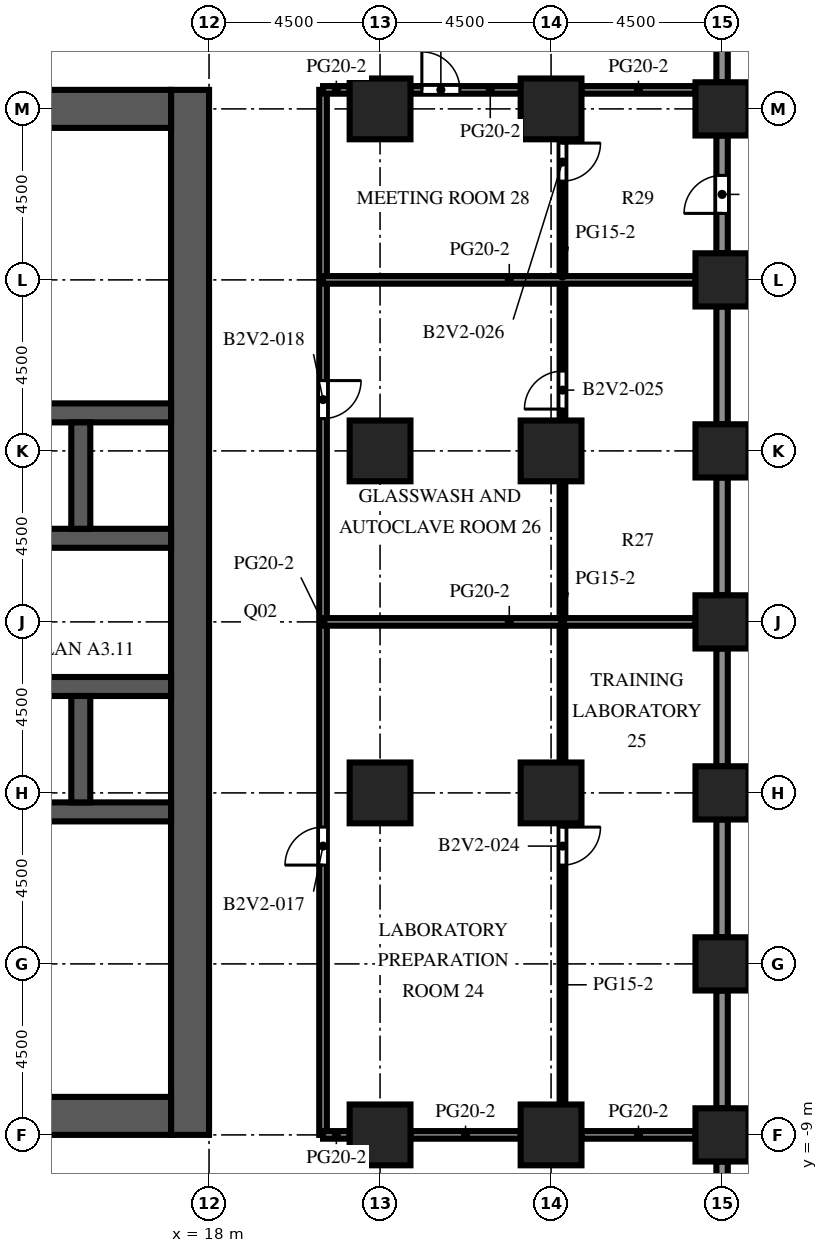
"""IFC4 building model, lengths in metres.
Left out: names, types, materials, properties, quantities, classifications, styles, units other than length and angle.
Written with IfcOpenShell. Run it as: python <this file> out.ifc"""

import sys

from ifc_helpers import new_model, si_unit, direction, frame, frame_2d, origin, origin_2d, place, context, subcontext, project, spatial, rectangle, extrude, element, fill, save


model = new_model("IFC4")
c1 = context("Model", 3, precision=1e-05, world=origin(), true_north=direction((0.0, 1.0)))
c2 = subcontext(c1, "Body", "Model", "MODEL_VIEW")
j1 = project(units=[si_unit("LENGTHUNIT", "METRE"), si_unit("PLANEANGLEUNIT", "RADIAN")], contexts=[c1])
p1 = place(None, origin())
s1 = spatial("IfcSite", under=j1, at=p1, CompositionType="ELEMENT")
p2 = place(p1, origin())
s2 = spatial("IfcBuilding", under=s1, at=p2, CompositionType="ELEMENT")
p3 = place(p2, frame((0.0, 0.0, 66.5)))
s3 = spatial("IfcBuildingStorey", under=s2, at=p3, CompositionType="ELEMENT", Elevation=66.5)
for number, where, z_axis, x_axis in (
    (1, (31.5, -9.0, 0.0), (0.0, 0.0, 1.0), (1.0, 0.0, 0.0)),
    (2, (31.5, -4.5, 0.0), (0.0, 0.0, 1.0), (1.0, 0.0, 0.0)),
    (3, (31.5, 0.0, 0.0), (0.0, 0.0, 1.0), (1.0, 0.0, 0.0)),
    (4, (31.5, 4.5, 0.0), (0.0, 0.0, 1.0), (1.0, 0.0, 0.0)),
    (5, (31.5, 9.0, 0.0), (0.0, 0.0, 1.0), (1.0, 0.0, 0.0)),
    (6, (31.5, 13.5, 0.0), (0.0, 0.0, 1.0), (1.0, 0.0, 0.0)),
    (7, (31.5, 18.0, 0.0), (0.0, 0.0, 1.0), (1.0, 0.0, 0.0)),
):
    element("IfcColumn", number, at=place(p3, frame(where, z_axis=z_axis, x_axis=x_axis)), inside=s3, PredefinedType="COLUMN", context=c2, shape_type="SweptSolid", body=[
        extrude(rectangle(XDim=1.4, YDim=1.4, at=origin_2d()), origin(), (0.0, 0.0, 1.0), 4.1),
    ])
for number, where, z_axis, x_axis in (
    (8, (22.5, -9.0, 0.0), (0.0, 0.0, 1.0), (1.0, 0.0, 0.0)),
    (9, (22.5, 0.0, 0.0), (0.0, 0.0, 1.0), (1.0, 0.0, 0.0)),
    (10, (22.5, 9.0, 0.0), (0.0, 0.0, 1.0), (1.0, 0.0, 0.0)),
    (11, (22.5, 18.0, 0.0), (0.0, 0.0, 1.0), (1.0, 0.0, 0.0)),
    (12, (27.0, -9.0, 0.0), (0.0, 0.0, 1.0), (1.0, 0.0, 0.0)),
    (13, (27.0, 0.0, 0.0), (0.0, 0.0, 1.0), (1.0, 0.0, 0.0)),
    (14, (27.0, 9.0, 0.0), (0.0, 0.0, 1.0), (1.0, 0.0, 0.0)),
    (15, (27.0, 18.0, 0.0), (0.0, 0.0, 1.0), (1.0, 0.0, 0.0)),
):
    element("IfcColumn", number, at=place(p3, frame(where, z_axis=z_axis, x_axis=x_axis)), inside=s3, PredefinedType="COLUMN", context=c2, shape_type="SweptSolid", body=[
        extrude(rectangle(XDim=1.6, YDim=1.6, at=origin_2d()), origin(), (0.0, 0.0, 1.0), 4.1),
    ])
p4 = place(p3, frame((17.5, -9.0, 0.0), z_axis=(0.0, 0.0, 1.0), x_axis=(0.0, 1.0, 0.0)))
e16 = element("IfcWall", 16, at=p4, inside=s3, PredefinedType="SHEAR", context=c2, shape_type="SweptSolid", body=[
    extrude(rectangle(XDim=27.5, YDim=1.0, at=frame_2d((13.75, 0.0))), origin(), (0.0, 0.0, 1.0), 4.1),
])
p5 = place(p4, frame((12.55, 0.0, 0.0)))
e17 = element("IfcOpeningElement", 17, at=p5, cuts=e16, PredefinedType="OPENING", context=c2, shape_type="SweptSolid", body=[
    extrude(rectangle(XDim=2.4, YDim=2.4, at=frame_2d((1.2, 1.2))), frame((0.0, 0.51, 0.0), z_axis=(0.0, -1.0, 0.0), x_axis=(1.0, 0.0, 0.0)), (0.0, 0.0, 1.0), 1.02),
])
p6 = place(p4, frame((6.825, 0.0, 0.0)))
e18 = element("IfcOpeningElement", 18, at=p6, cuts=e16, PredefinedType="OPENING", context=c2, shape_type="SweptSolid", body=[
    extrude(rectangle(XDim=1.2, YDim=2.1, at=frame_2d((0.6, 1.05))), frame((0.0, 0.51, 0.0), z_axis=(0.0, -1.0, 0.0), x_axis=(1.0, 0.0, 0.0)), (0.0, 0.0, 1.0), 1.02),
])
p7 = place(p4, frame((19.475, 0.0, 0.0)))
e19 = element("IfcOpeningElement", 19, at=p7, cuts=e16, PredefinedType="OPENING", context=c2, shape_type="SweptSolid", body=[
    extrude(rectangle(XDim=1.2, YDim=2.1, at=frame_2d((0.6, 1.05))), frame((0.0, 0.51, 0.0), z_axis=(0.0, -1.0, 0.0), x_axis=(1.0, 0.0, 0.0)), (0.0, 0.0, 1.0), 1.02),
])
for number, where, z_axis, x_axis in (
    (20, (7.0, -8.5, 0.0), (0.0, 0.0, 1.0), (1.0, 0.0, 0.0)),
    (21, (7.0, 18.0, 0.0), (0.0, 0.0, 1.0), (1.0, 0.0, 0.0)),
):
    element("IfcWall", number, at=place(p3, frame(where, z_axis=z_axis, x_axis=x_axis)), inside=s3, PredefinedType="SHEAR", context=c2, shape_type="SweptSolid", body=[
        extrude(rectangle(XDim=10.0, YDim=1.0, at=frame_2d((5.0, 0.0))), origin(), (0.0, 0.0, 1.0), 4.1),
    ])
p8 = place(p3, frame((7.0, -0.5, 0.0), z_axis=(0.0, 0.0, 1.0), x_axis=(1.0, 0.0, 0.0)))
e22 = element("IfcWall", 22, at=p8, inside=s3, PredefinedType="SHEAR", context=c2, shape_type="SweptSolid", body=[
    extrude(rectangle(XDim=10.0, YDim=0.5, at=frame_2d((5.0, 0.0))), origin(), (0.0, 0.0, 1.0), 4.1),
])
p9 = place(p3, frame((7.0, 2.8, 0.0), z_axis=(0.0, 0.0, 1.0), x_axis=(1.0, 0.0, 0.0)))
e23 = element("IfcWall", 23, at=p9, inside=s3, PredefinedType="SHEAR", context=c2, shape_type="SweptSolid", body=[
    extrude(rectangle(XDim=10.0, YDim=0.5, at=frame_2d((5.0, 0.0))), origin(), (0.0, 0.0, 1.0), 4.1),
])
p10 = place(p9, frame((0.512, 0.0, 0.0)))
e24 = element("IfcOpeningElement", 24, at=p10, cuts=e23, PredefinedType="OPENING", context=c2, shape_type="SweptSolid", body=[
    extrude(rectangle(XDim=1.1, YDim=2.1, at=frame_2d((0.55, 1.05))), frame((0.0, 0.26, 0.0), z_axis=(0.0, -1.0, 0.0), x_axis=(1.0, 0.0, 0.0)), (0.0, 0.0, 1.0), 0.52),
])
p11 = place(p9, frame((3.137, 0.0, 0.0)))
e25 = element("IfcOpeningElement", 25, at=p11, cuts=e23, PredefinedType="OPENING", context=c2, shape_type="SweptSolid", body=[
    extrude(rectangle(XDim=1.1, YDim=2.1, at=frame_2d((0.55, 1.05))), frame((0.0, 0.26, 0.0), z_axis=(0.0, -1.0, 0.0), x_axis=(1.0, 0.0, 0.0)), (0.0, 0.0, 1.0), 0.52),
])
p12 = place(p9, frame((8.387, 0.0, 0.0)))
e26 = element("IfcOpeningElement", 26, at=p12, cuts=e23, PredefinedType="OPENING", context=c2, shape_type="SweptSolid", body=[
    extrude(rectangle(XDim=1.1, YDim=2.1, at=frame_2d((0.55, 1.05))), frame((0.0, 0.26, 0.0), z_axis=(0.0, -1.0, 0.0), x_axis=(1.0, 0.0, 0.0)), (0.0, 0.0, 1.0), 0.52),
])
p13 = place(p3, frame((7.0, 6.7, 0.0), z_axis=(0.0, 0.0, 1.0), x_axis=(1.0, 0.0, 0.0)))
e27 = element("IfcWall", 27, at=p13, inside=s3, PredefinedType="SHEAR", context=c2, shape_type="SweptSolid", body=[
    extrude(rectangle(XDim=10.0, YDim=0.5, at=frame_2d((5.0, 0.0))), origin(), (0.0, 0.0, 1.0), 4.1),
])
p14 = place(p13, frame((0.512, 0.0, 0.0)))
e28 = element("IfcOpeningElement", 28, at=p14, cuts=e27, PredefinedType="OPENING", context=c2, shape_type="SweptSolid", body=[
    extrude(rectangle(XDim=1.1, YDim=2.1, at=frame_2d((0.55, 1.05))), frame((0.0, 0.26, 0.0), z_axis=(0.0, -1.0, 0.0), x_axis=(1.0, 0.0, 0.0)), (0.0, 0.0, 1.0), 0.52),
])
p15 = place(p13, frame((3.188, 0.0, 0.0)))
e29 = element("IfcOpeningElement", 29, at=p15, cuts=e27, PredefinedType="OPENING", context=c2, shape_type="SweptSolid", body=[
    extrude(rectangle(XDim=1.0, YDim=2.1, at=frame_2d((0.5, 1.05))), frame((0.0, 0.26, 0.0), z_axis=(0.0, -1.0, 0.0), x_axis=(1.0, 0.0, 0.0)), (0.0, 0.0, 1.0), 0.52),
])
p16 = place(p13, frame((5.812, 0.0, 0.0)))
e30 = element("IfcOpeningElement", 30, at=p16, cuts=e27, PredefinedType="OPENING", context=c2, shape_type="SweptSolid", body=[
    extrude(rectangle(XDim=1.0, YDim=2.1, at=frame_2d((0.5, 1.05))), frame((0.0, 0.26, 0.0), z_axis=(0.0, -1.0, 0.0), x_axis=(1.0, 0.0, 0.0)), (0.0, 0.0, 1.0), 0.52),
])
p17 = place(p13, frame((8.438, 0.0, 0.0)))
e31 = element("IfcOpeningElement", 31, at=p17, cuts=e27, PredefinedType="OPENING", context=c2, shape_type="SweptSolid", body=[
    extrude(rectangle(XDim=1.0, YDim=2.1, at=frame_2d((0.5, 1.05))), frame((0.0, 0.26, 0.0), z_axis=(0.0, -1.0, 0.0), x_axis=(1.0, 0.0, 0.0)), (0.0, 0.0, 1.0), 0.52),
])
p18 = place(p3, frame((7.0, 10.0, 0.0), z_axis=(0.0, 0.0, 1.0), x_axis=(1.0, 0.0, 0.0)))
e32 = element("IfcWall", 32, at=p18, inside=s3, PredefinedType="SHEAR", context=c2, shape_type="SweptSolid", body=[
    extrude(rectangle(XDim=10.0, YDim=0.5, at=frame_2d((5.0, 0.0))), origin(), (0.0, 0.0, 1.0), 4.1),
])
for number, where, z_axis, x_axis in (
    (33, (14.625, -0.25, 0.0), (0.0, 0.0, 1.0), (0.0, 1.0, 0.0)),
    (34, (14.625, 6.95, 0.0), (0.0, 0.0, 1.0), (0.0, 1.0, 0.0)),
):
    element("IfcWall", number, at=place(p3, frame(where, z_axis=z_axis, x_axis=x_axis)), inside=s3, PredefinedType="SHEAR", context=c2, shape_type="SweptSolid", body=[
        extrude(rectangle(XDim=2.8, YDim=0.5, at=frame_2d((1.4, 0.0))), origin(), (0.0, 0.0, 1.0), 4.1),
    ])
for number, where, z_axis, x_axis in (
    (35, (31.5, -9.7, 0.0), (0.0, 0.0, 1.0), (0.0, -1.0, 0.0)),
    (36, (31.5, -5.2, 0.0), (0.0, 0.0, 1.0), (0.0, -1.0, 0.0)),
    (37, (31.5, -0.7, 0.0), (0.0, 0.0, 1.0), (0.0, -1.0, 0.0)),
    (38, (31.5, 3.8, 0.0), (0.0, 0.0, 1.0), (0.0, -1.0, 0.0)),
    (39, (31.5, 8.3, 0.0), (0.0, 0.0, 1.0), (0.0, -1.0, 0.0)),
    (40, (31.5, 12.8, 0.0), (0.0, 0.0, 1.0), (0.0, -1.0, 0.0)),
):
    element("IfcWall", number, at=place(p3, frame(where, z_axis=z_axis, x_axis=x_axis)), inside=s3, PredefinedType="SOLIDWALL", context=c2, shape_type="SweptSolid", body=[
        extrude(rectangle(XDim=3.1, YDim=0.3, at=frame_2d((1.55, 0.0))), origin(), (0.0, 0.0, 1.0), 2.6),
    ])
p19 = place(p3, frame((31.5, 17.3, 0.0), z_axis=(0.0, 0.0, 1.0), x_axis=(0.0, -1.0, 0.0)))
e41 = element("IfcWall", 41, at=p19, inside=s3, PredefinedType="SOLIDWALL", context=c2, shape_type="SweptSolid", body=[
    extrude(rectangle(XDim=3.1, YDim=0.3, at=frame_2d((1.55, 0.0))), origin(), (0.0, 0.0, 1.0), 2.6),
])
p20 = place(p19, frame((1.05, 0.0, 0.0)))
e42 = element("IfcOpeningElement", 42, at=p20, cuts=e41, PredefinedType="OPENING", context=c2, shape_type="SweptSolid", body=[
    extrude(rectangle(XDim=1.0, YDim=2.2, at=frame_2d((0.5, 1.1))), frame((0.0, 0.16, 0.0), z_axis=(0.0, -1.0, 0.0), x_axis=(1.0, 0.0, 0.0)), (0.0, 0.0, 1.0), 0.32),
])
p21 = place(p3, frame((31.5, 21.8, 0.0), z_axis=(0.0, 0.0, 1.0), x_axis=(0.0, -1.0, 0.0)))
e43 = element("IfcWall", 43, at=p21, inside=s3, PredefinedType="SOLIDWALL", context=c2, shape_type="SweptSolid", body=[
    extrude(rectangle(XDim=3.1, YDim=0.3, at=frame_2d((1.55, 0.0))), origin(), (0.0, 0.0, 1.0), 2.6),
])
p22 = place(p3, frame((21.0, 18.5, 0.0), z_axis=(0.0, 0.0, 1.0), x_axis=(0.0, -1.0, 0.0)))
e44 = element("IfcWall", 44, at=p22, inside=s3, PredefinedType="PARTITIONING", context=c2, shape_type="SweptSolid", body=[
    extrude(rectangle(XDim=27.5, YDim=0.2, at=frame_2d((13.75, 0.0))), origin(), (0.0, 0.0, 1.0), 3.5),
])
p23 = place(p22, frame((19.4, 0.0, 0.0)))
e45 = element("IfcOpeningElement", 45, at=p23, cuts=e44, PredefinedType="OPENING", context=c2, shape_type="SweptSolid", body=[
    extrude(rectangle(XDim=1.0, YDim=2.1, at=frame_2d((0.5, 1.05))), frame((0.0, 0.11, 0.0), z_axis=(0.0, -1.0, 0.0), x_axis=(1.0, 0.0, 0.0)), (0.0, 0.0, 1.0), 0.22),
])
p24 = place(p22, frame((7.65, 0.0, 0.0)))
e46 = element("IfcOpeningElement", 46, at=p24, cuts=e44, PredefinedType="OPENING", context=c2, shape_type="SweptSolid", body=[
    extrude(rectangle(XDim=1.0, YDim=2.1, at=frame_2d((0.5, 1.05))), frame((0.0, 0.11, 0.0), z_axis=(0.0, -1.0, 0.0), x_axis=(1.0, 0.0, 0.0)), (0.0, 0.0, 1.0), 0.22),
])
p25 = place(p3, frame((27.3, -0.8, 0.0), z_axis=(0.0, 0.0, 1.0), x_axis=(0.0, -1.0, 0.0)))
e47 = element("IfcWall", 47, at=p25, inside=s3, PredefinedType="PARTITIONING", context=c2, shape_type="SweptSolid", body=[
    extrude(rectangle(XDim=7.4, YDim=0.15, at=frame_2d((3.7, 0.0))), origin(), (0.0, 0.0, 1.0), 3.5),
])
p26 = place(p25, frame((0.1, 0.0, 0.0)))
e48 = element("IfcOpeningElement", 48, at=p26, cuts=e47, PredefinedType="OPENING", context=c2, shape_type="SweptSolid", body=[
    extrude(rectangle(XDim=1.0, YDim=2.1, at=frame_2d((0.5, 1.05))), frame((0.0, 0.085, 0.0), z_axis=(0.0, -1.0, 0.0), x_axis=(1.0, 0.0, 0.0)), (0.0, 0.0, 1.0), 0.17),
])
p27 = place(p3, frame((27.3, 0.8, 0.0), z_axis=(0.0, 0.0, 1.0), x_axis=(0.0, 1.0, 0.0)))
e49 = element("IfcWall", 49, at=p27, inside=s3, PredefinedType="PARTITIONING", context=c2, shape_type="SweptSolid", body=[
    extrude(rectangle(XDim=7.4, YDim=0.15, at=frame_2d((3.7, 0.0))), origin(), (0.0, 0.0, 1.0), 3.5),
])
p28 = place(p3, frame((27.3, 17.2, 0.0), z_axis=(0.0, 0.0, 1.0), x_axis=(0.0, -1.0, 0.0)))
e50 = element("IfcWall", 50, at=p28, inside=s3, PredefinedType="PARTITIONING", context=c2, shape_type="SweptSolid", body=[
    extrude(rectangle(XDim=7.4, YDim=0.15, at=frame_2d((3.7, 0.0))), origin(), (0.0, 0.0, 1.0), 3.5),
])
p29 = place(p28, frame((6.1, 0.0, 0.0)))
e51 = element("IfcOpeningElement", 51, at=p29, cuts=e50, PredefinedType="OPENING", context=c2, shape_type="SweptSolid", body=[
    extrude(rectangle(XDim=1.0, YDim=2.1, at=frame_2d((0.5, 1.05))), frame((0.0, 0.085, 0.0), z_axis=(0.0, -1.0, 0.0), x_axis=(1.0, 0.0, 0.0)), (0.0, 0.0, 1.0), 0.17),
])
p30 = place(p28, frame((0.1, 0.0, 0.0)))
e52 = element("IfcOpeningElement", 52, at=p30, cuts=e50, PredefinedType="OPENING", context=c2, shape_type="SweptSolid", body=[
    extrude(rectangle(XDim=1.0, YDim=2.1, at=frame_2d((0.5, 1.05))), frame((0.0, 0.085, 0.0), z_axis=(0.0, -1.0, 0.0), x_axis=(1.0, 0.0, 0.0)), (0.0, 0.0, 1.0), 0.17),
])
p31 = place(p3, frame((21.0, -9.0, 0.0), z_axis=(0.0, 0.0, 1.0), x_axis=(1.0, 0.0, 0.0)))
e53 = element("IfcWall", 53, at=p31, inside=s3, PredefinedType="PARTITIONING", context=c2, shape_type="SweptSolid", body=[
    extrude(rectangle(XDim=0.7, YDim=0.2, at=frame_2d((0.35, 0.0))), origin(), (0.0, 0.0, 1.0), 3.5),
])
p32 = place(p3, frame((23.3, -9.0, 0.0), z_axis=(0.0, 0.0, 1.0), x_axis=(1.0, 0.0, 0.0)))
e54 = element("IfcWall", 54, at=p32, inside=s3, PredefinedType="PARTITIONING", context=c2, shape_type="SweptSolid", body=[
    extrude(rectangle(XDim=2.9, YDim=0.2, at=frame_2d((1.45, 0.0))), origin(), (0.0, 0.0, 1.0), 3.5),
])
p33 = place(p3, frame((27.8, -9.0, 0.0), z_axis=(0.0, 0.0, 1.0), x_axis=(1.0, 0.0, 0.0)))
e55 = element("IfcWall", 55, at=p33, inside=s3, PredefinedType="PARTITIONING", context=c2, shape_type="SweptSolid", body=[
    extrude(rectangle(XDim=3.0, YDim=0.2, at=frame_2d((1.5, 0.0))), origin(), (0.0, 0.0, 1.0), 3.5),
])
for number, where, z_axis, x_axis in (
    (56, (21.0, 4.5, 0.0), (0.0, 0.0, 1.0), (1.0, 0.0, 0.0)),
    (57, (21.0, 13.5, 0.0), (0.0, 0.0, 1.0), (1.0, 0.0, 0.0)),
):
    element("IfcWall", number, at=place(p3, frame(where, z_axis=z_axis, x_axis=x_axis)), inside=s3, PredefinedType="PARTITIONING", context=c2, shape_type="SweptSolid", body=[
        extrude(rectangle(XDim=9.8, YDim=0.2, at=frame_2d((4.9, 0.0))), origin(), (0.0, 0.0, 1.0), 3.5),
    ])
p34 = place(p3, frame((21.0, 18.5, 0.0), z_axis=(0.0, 0.0, 1.0), x_axis=(1.0, 0.0, 0.0)))
e58 = element("IfcWall", 58, at=p34, inside=s3, PredefinedType="PARTITIONING", context=c2, shape_type="SweptSolid", body=[
    extrude(rectangle(XDim=0.7, YDim=0.2, at=frame_2d((0.35, 0.0))), origin(), (0.0, 0.0, 1.0), 3.5),
])
p35 = place(p3, frame((26.2, 18.5, 0.0), z_axis=(0.0, 0.0, 1.0), x_axis=(-1.0, 0.0, 0.0)))
e59 = element("IfcWall", 59, at=p35, inside=s3, PredefinedType="PARTITIONING", context=c2, shape_type="SweptSolid", body=[
    extrude(rectangle(XDim=2.9, YDim=0.2, at=frame_2d((1.45, 0.0))), origin(), (0.0, 0.0, 1.0), 3.5),
])
p36 = place(p35, frame((1.6, 0.0, 0.0)))
e60 = element("IfcOpeningElement", 60, at=p36, cuts=e59, PredefinedType="OPENING", context=c2, shape_type="SweptSolid", body=[
    extrude(rectangle(XDim=1.0, YDim=2.1, at=frame_2d((0.5, 1.05))), frame((0.0, 0.11, 0.0), z_axis=(0.0, -1.0, 0.0), x_axis=(1.0, 0.0, 0.0)), (0.0, 0.0, 1.0), 0.22),
])
p37 = place(p3, frame((27.8, 18.5, 0.0), z_axis=(0.0, 0.0, 1.0), x_axis=(1.0, 0.0, 0.0)))
e61 = element("IfcWall", 61, at=p37, inside=s3, PredefinedType="PARTITIONING", context=c2, shape_type="SweptSolid", body=[
    extrude(rectangle(XDim=3.0, YDim=0.2, at=frame_2d((1.5, 0.0))), origin(), (0.0, 0.0, 1.0), 3.5),
])
p38 = place(p20, origin())
e62 = element("IfcDoor", 62, at=p38, inside=s3, OperationType="SINGLE_SWING_RIGHT", PredefinedType="DOOR", context=c2, shape_type="SweptSolid", body=[
    extrude(rectangle(XDim=1.0, YDim=2.2, at=frame_2d((0.5, 1.1))), frame((0.0, 0.025, 0.0), z_axis=(0.0, -1.0, 0.0), x_axis=(1.0, 0.0, 0.0)), (0.0, 0.0, 1.0), 0.05),
])
fill(e42, e62)
p39 = place(p12, origin())
e63 = element("IfcDoor", 63, at=p39, inside=s3, OperationType="DOUBLE_DOOR_SLIDING", PredefinedType="DOOR", context=c2, shape_type="SweptSolid", body=[
    extrude(rectangle(XDim=1.1, YDim=2.1, at=frame_2d((0.55, 1.05))), frame((0.0, 0.025, 0.0), z_axis=(0.0, -1.0, 0.0), x_axis=(1.0, 0.0, 0.0)), (0.0, 0.0, 1.0), 0.05),
])
fill(e26, e63)
p40 = place(p5, origin())
e64 = element("IfcDoor", 64, at=p40, inside=s3, OperationType="DOUBLE_DOOR_DOUBLE_SWING", PredefinedType="DOOR", context=c2, shape_type="SweptSolid", body=[
    extrude(rectangle(XDim=2.4, YDim=2.4, at=frame_2d((1.2, 1.2))), frame((0.0, 0.025, 0.0), z_axis=(0.0, -1.0, 0.0), x_axis=(1.0, 0.0, 0.0)), (0.0, 0.0, 1.0), 0.05),
])
fill(e17, e64)
p41 = place(p6, frame((1.2, 0.0, 0.0), z_axis=(0.0, 0.0, 1.0), x_axis=(-1.0, 0.0, 0.0)))
e65 = element("IfcDoor", 65, at=p41, inside=s3, OperationType="SINGLE_SWING_LEFT", PredefinedType="DOOR", context=c2, shape_type="SweptSolid", body=[
    extrude(rectangle(XDim=1.2, YDim=2.1, at=frame_2d((0.6, 1.05))), frame((0.0, 0.025, 0.0), z_axis=(0.0, -1.0, 0.0), x_axis=(1.0, 0.0, 0.0)), (0.0, 0.0, 1.0), 0.05),
])
fill(e18, e65)
p42 = place(p7, frame((1.2, 0.0, 0.0), z_axis=(0.0, 0.0, 1.0), x_axis=(-1.0, 0.0, 0.0)))
e66 = element("IfcDoor", 66, at=p42, inside=s3, OperationType="SINGLE_SWING_LEFT", PredefinedType="DOOR", context=c2, shape_type="SweptSolid", body=[
    extrude(rectangle(XDim=1.2, YDim=2.1, at=frame_2d((0.6, 1.05))), frame((0.0, 0.025, 0.0), z_axis=(0.0, -1.0, 0.0), x_axis=(1.0, 0.0, 0.0)), (0.0, 0.0, 1.0), 0.05),
])
fill(e19, e66)
p43 = place(p17, origin())
e67 = element("IfcDoor", 67, at=p43, inside=s3, OperationType="SINGLE_SWING_RIGHT", PredefinedType="DOOR", context=c2, shape_type="SweptSolid", body=[
    extrude(rectangle(XDim=1.0, YDim=2.1, at=frame_2d((0.5, 1.05))), frame((0.0, 0.025, 0.0), z_axis=(0.0, -1.0, 0.0), x_axis=(1.0, 0.0, 0.0)), (0.0, 0.0, 1.0), 0.05),
])
fill(e31, e67)
p44 = place(p36, origin())
e68 = element("IfcDoor", 68, at=p44, inside=s3, OperationType="SINGLE_SWING_RIGHT", PredefinedType="DOOR", context=c2, shape_type="SweptSolid", body=[
    extrude(rectangle(XDim=1.0, YDim=2.1, at=frame_2d((0.5, 1.05))), frame((0.0, 0.025, 0.0), z_axis=(0.0, -1.0, 0.0), x_axis=(1.0, 0.0, 0.0)), (0.0, 0.0, 1.0), 0.05),
])
fill(e60, e68)
p45 = place(p23, origin())
e69 = element("IfcDoor", 69, at=p45, inside=s3, OperationType="SINGLE_SWING_RIGHT", PredefinedType="DOOR", context=c2, shape_type="SweptSolid", body=[
    extrude(rectangle(XDim=1.0, YDim=2.1, at=frame_2d((0.5, 1.05))), frame((0.0, 0.025, 0.0), z_axis=(0.0, -1.0, 0.0), x_axis=(1.0, 0.0, 0.0)), (0.0, 0.0, 1.0), 0.05),
])
fill(e45, e69)
p46 = place(p24, origin())
e70 = element("IfcDoor", 70, at=p46, inside=s3, OperationType="SINGLE_SWING_LEFT", PredefinedType="DOOR", context=c2, shape_type="SweptSolid", body=[
    extrude(rectangle(XDim=1.0, YDim=2.1, at=frame_2d((0.5, 1.05))), frame((0.0, 0.025, 0.0), z_axis=(0.0, -1.0, 0.0), x_axis=(1.0, 0.0, 0.0)), (0.0, 0.0, 1.0), 0.05),
])
fill(e46, e70)
p47 = place(p26, origin())
e71 = element("IfcDoor", 71, at=p47, inside=s3, OperationType="SINGLE_SWING_LEFT", PredefinedType="DOOR", context=c2, shape_type="SweptSolid", body=[
    extrude(rectangle(XDim=1.0, YDim=2.1, at=frame_2d((0.5, 1.05))), frame((0.0, 0.025, 0.0), z_axis=(0.0, -1.0, 0.0), x_axis=(1.0, 0.0, 0.0)), (0.0, 0.0, 1.0), 0.05),
])
fill(e48, e71)
p48 = place(p29, origin())
e72 = element("IfcDoor", 72, at=p48, inside=s3, OperationType="SINGLE_SWING_RIGHT", PredefinedType="DOOR", context=c2, shape_type="SweptSolid", body=[
    extrude(rectangle(XDim=1.0, YDim=2.1, at=frame_2d((0.5, 1.05))), frame((0.0, 0.025, 0.0), z_axis=(0.0, -1.0, 0.0), x_axis=(1.0, 0.0, 0.0)), (0.0, 0.0, 1.0), 0.05),
])
fill(e51, e72)
p49 = place(p30, origin())
e73 = element("IfcDoor", 73, at=p49, inside=s3, OperationType="SINGLE_SWING_LEFT", PredefinedType="DOOR", context=c2, shape_type="SweptSolid", body=[
    extrude(rectangle(XDim=1.0, YDim=2.1, at=frame_2d((0.5, 1.05))), frame((0.0, 0.025, 0.0), z_axis=(0.0, -1.0, 0.0), x_axis=(1.0, 0.0, 0.0)), (0.0, 0.0, 1.0), 0.05),
])
fill(e52, e73)
save(model, sys.argv[1])
